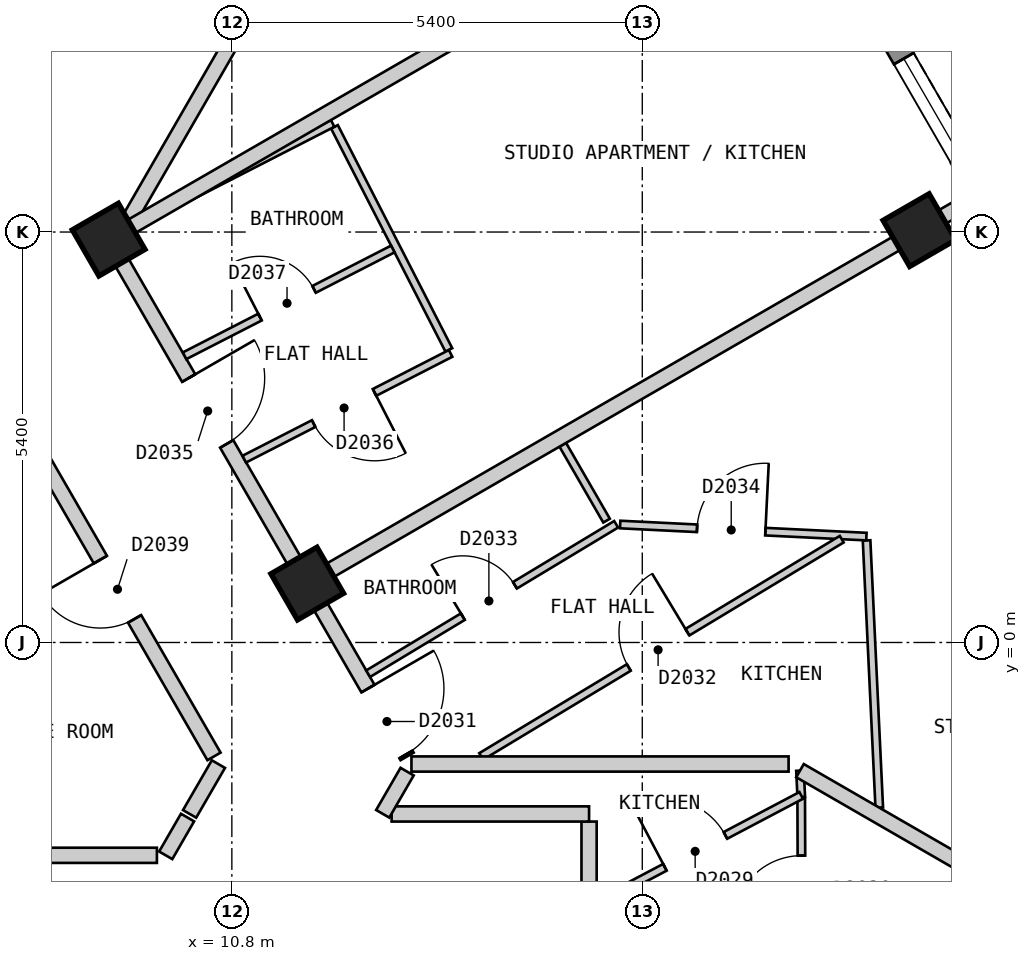
"""IFC4 building model, lengths in metres.
Left out: names, types, materials, properties, quantities, classifications, styles, units other than length and angle.
Written with IfcOpenShell. Run it as: python <this file> out.ifc"""

import sys

from ifc_helpers import new_model, si_unit, direction, frame, frame_2d, origin, origin_2d, place, context, subcontext, project, spatial, polyline, rectangle, outline, extrude, element, fill, save


model = new_model("IFC4")
c1 = context("Model", 3, precision=1e-05, world=origin(), true_north=direction((0.0, 1.0)))
c2 = subcontext(c1, "Body", "Model", "MODEL_VIEW")
j1 = project(units=[si_unit("LENGTHUNIT", "METRE"), si_unit("PLANEANGLEUNIT", "RADIAN")], contexts=[c1])
p1 = place(None, origin())
s1 = spatial("IfcSite", under=j1, at=p1, CompositionType="ELEMENT")
p2 = place(p1, origin())
s2 = spatial("IfcBuilding", under=s1, at=p2, CompositionType="ELEMENT")
p3 = place(p2, frame((0.0, 0.0, 238.8)))
s3 = spatial("IfcBuildingStorey", under=s2, at=p3, CompositionType="ELEMENT", Elevation=238.8)
for number, where, z_axis, x_axis in (
    (1, (19.846, 5.425, 0.0), (0.0, 0.0, 1.0), (-0.5, 0.866, 0.0)),
    (2, (11.792, 0.775, 0.0), (0.0, 0.0, 1.0), (-0.5, 0.866, 0.0)),
    (3, (9.179, 5.3, 0.0), (0.0, 0.0, 1.0), (-0.5, 0.866, 0.0)),
):
    element("IfcColumn", number, at=place(p3, frame(where, z_axis=z_axis, x_axis=x_axis)), inside=s3, PredefinedType="COLUMN", context=c2, shape_type="SweptSolid", body=[
        extrude(rectangle(XDim=0.7, YDim=0.7, at=origin_2d()), origin(), (0.0, 0.0, 1.0), 3.0),
    ])
p4 = place(p3, frame((23.599, 0.825, 0.0), z_axis=(0.0, 0.0, 1.0), x_axis=(-0.500003656944, 0.866023292436, 0.0)))
e4 = element("IfcWall", 4, at=p4, inside=s3, PredefinedType="SOLIDWALL", context=c2, shape_type="SweptSolid", body=[
    extrude(outline(polyline([(0.0, -0.15), (22.17, -0.15), (22.09, 0.15), (0.08, 0.15), (0.0, -0.15)])), origin(), (0.0, 0.0, 1.0), 2.7),
])
p5 = place(p4, frame((1.191, 0.0, 0.15)))
e5 = element("IfcOpeningElement", 5, at=p5, cuts=e4, PredefinedType="OPENING", context=c2, shape_type="SweptSolid", body=[
    extrude(rectangle(XDim=1.5, YDim=2.1, at=frame_2d((0.75, 1.05))), frame((0.0, 0.16, 0.0), z_axis=(0.0, -1.0, 0.0), x_axis=(1.0, 0.0, 0.0)), (0.0, 0.0, 1.0), 0.32),
])
p6 = place(p4, frame((3.804, 0.0, 0.15)))
e6 = element("IfcOpeningElement", 6, at=p6, cuts=e4, PredefinedType="OPENING", context=c2, shape_type="SweptSolid", body=[
    extrude(rectangle(XDim=1.5, YDim=2.1, at=frame_2d((0.75, 1.05))), frame((0.0, 0.16, 0.0), z_axis=(0.0, -1.0, 0.0), x_axis=(1.0, 0.0, 0.0)), (0.0, 0.0, 1.0), 0.32),
])
p7 = place(p4, frame((6.417, 0.0, 0.15)))
e7 = element("IfcOpeningElement", 7, at=p7, cuts=e4, PredefinedType="OPENING", context=c2, shape_type="SweptSolid", body=[
    extrude(rectangle(XDim=1.5, YDim=2.1, at=frame_2d((0.75, 1.05))), frame((0.0, 0.16, 0.0), z_axis=(0.0, -1.0, 0.0), x_axis=(1.0, 0.0, 0.0)), (0.0, 0.0, 1.0), 0.32),
])
p8 = place(p4, frame((9.029, 0.0, 0.15)))
e8 = element("IfcOpeningElement", 8, at=p8, cuts=e4, PredefinedType="OPENING", context=c2, shape_type="SweptSolid", body=[
    extrude(rectangle(XDim=1.5, YDim=2.1, at=frame_2d((0.75, 1.05))), frame((0.0, 0.16, 0.0), z_axis=(0.0, -1.0, 0.0), x_axis=(1.0, 0.0, 0.0)), (0.0, 0.0, 1.0), 0.32),
])
p9 = place(p4, frame((11.641, 0.0, 0.15)))
e9 = element("IfcOpeningElement", 9, at=p9, cuts=e4, PredefinedType="OPENING", context=c2, shape_type="SweptSolid", body=[
    extrude(rectangle(XDim=1.5, YDim=2.1, at=frame_2d((0.75, 1.05))), frame((0.0, 0.16, 0.0), z_axis=(0.0, -1.0, 0.0), x_axis=(1.0, 0.0, 0.0)), (0.0, 0.0, 1.0), 0.32),
])
p10 = place(p4, frame((14.254, 0.0, 0.15)))
e10 = element("IfcOpeningElement", 10, at=p10, cuts=e4, PredefinedType="OPENING", context=c2, shape_type="SweptSolid", body=[
    extrude(rectangle(XDim=1.5, YDim=2.1, at=frame_2d((0.75, 1.05))), frame((0.0, 0.16, 0.0), z_axis=(0.0, -1.0, 0.0), x_axis=(1.0, 0.0, 0.0)), (0.0, 0.0, 1.0), 0.32),
])
p11 = place(p4, frame((16.866, 0.0, 0.15)))
e11 = element("IfcOpeningElement", 11, at=p11, cuts=e4, PredefinedType="OPENING", context=c2, shape_type="SweptSolid", body=[
    extrude(rectangle(XDim=1.5, YDim=2.1, at=frame_2d((0.75, 1.05))), frame((0.0, 0.16, 0.0), z_axis=(0.0, -1.0, 0.0), x_axis=(1.0, 0.0, 0.0)), (0.0, 0.0, 1.0), 0.32),
])
p12 = place(p4, frame((19.479, 0.0, 0.15)))
e12 = element("IfcOpeningElement", 12, at=p12, cuts=e4, PredefinedType="OPENING", context=c2, shape_type="SweptSolid", body=[
    extrude(rectangle(XDim=1.5, YDim=2.1, at=frame_2d((0.75, 1.05))), frame((0.0, 0.16, 0.0), z_axis=(0.0, -1.0, 0.0), x_axis=(1.0, 0.0, 0.0)), (0.0, 0.0, 1.0), 0.32),
])
p13 = place(p3, frame((8.026, 2.899, 0.0), z_axis=(0.0, 0.0, 1.0), x_axis=(0.499986018985, -0.866033475577, 0.0)))
e13 = element("IfcWall", 13, at=p13, inside=s3, PredefinedType="PARTITIONING", context=c2, shape_type="SweptSolid", body=[
    extrude(rectangle(XDim=5.078, YDim=0.2, at=frame_2d((2.539, 0.0))), origin(), (0.0, 0.0, 1.0), 2.7),
])
p14 = place(p13, frame((2.089, 0.0, 0.0)))
e14 = element("IfcOpeningElement", 14, at=p14, cuts=e13, PredefinedType="OPENING", context=c2, shape_type="SweptSolid", body=[
    extrude(rectangle(XDim=0.9, YDim=2.1, at=frame_2d((0.45, 1.05))), frame((0.0, 0.11, 0.0), z_axis=(0.0, -1.0, 0.0), x_axis=(1.0, 0.0, 0.0)), (0.0, 0.0, 1.0), 0.22),
])
p15 = place(p3, frame((9.238, 5.2, 0.0), z_axis=(0.0, 0.0, 1.0), x_axis=(0.500025705601, -0.86601056214, 0.0)))
e15 = element("IfcWall", 15, at=p15, inside=s3, PredefinedType="PARTITIONING", context=c2, shape_type="SweptSolid", body=[
    extrude(rectangle(XDim=7.735, YDim=0.2, at=frame_2d((3.868, 0.0))), origin(), (0.0, 0.0, 1.0), 2.7),
])
p16 = place(p15, frame((6.705, 0.0, 0.0)))
e16 = element("IfcOpeningElement", 16, at=p16, cuts=e15, PredefinedType="OPENING", context=c2, shape_type="SweptSolid", body=[
    extrude(rectangle(XDim=1.0, YDim=2.1, at=frame_2d((0.5, 1.05))), frame((0.0, 0.11, 0.0), z_axis=(0.0, -1.0, 0.0), x_axis=(1.0, 0.0, 0.0)), (0.0, 0.0, 1.0), 0.22),
])
p17 = place(p15, frame((1.988, 0.0, 0.0)))
e17 = element("IfcOpeningElement", 17, at=p17, cuts=e15, PredefinedType="OPENING", context=c2, shape_type="SweptSolid", body=[
    extrude(rectangle(XDim=1.0, YDim=2.1, at=frame_2d((0.5, 1.05))), frame((0.0, 0.11, 0.0), z_axis=(0.0, -1.0, 0.0), x_axis=(1.0, 0.0, 0.0)), (0.0, 0.0, 1.0), 0.22),
])
p18 = place(p3, frame((15.5, -2.356, 0.0), z_axis=(0.0, 0.0, 1.0), x_axis=(0.0, -1.0, 0.0)))
e18 = element("IfcWall", 18, at=p18, inside=s3, PredefinedType="PARTITIONING", context=c2, shape_type="SweptSolid", body=[
    extrude(rectangle(XDim=1.071, YDim=0.2, at=frame_2d((0.536, 0.0))), origin(), (0.0, 0.0, 1.0), 2.7),
])
p19 = place(p3, frame((12.902, -2.256, 0.0), z_axis=(0.0, 0.0, 1.0), x_axis=(1.0, 0.0, 0.0)))
e19 = element("IfcWall", 19, at=p19, inside=s3, PredefinedType="PARTITIONING", context=c2, shape_type="SweptSolid", body=[
    extrude(rectangle(XDim=2.598, YDim=0.2, at=frame_2d((1.299, 0.0))), origin(), (0.0, 0.0, 1.0), 2.7),
])
p20 = place(p3, frame((6.929, -2.8, 0.0), z_axis=(0.0, 0.0, 1.0), x_axis=(1.0, 0.0, 0.0)))
e20 = element("IfcWall", 20, at=p20, inside=s3, PredefinedType="PARTITIONING", context=c2, shape_type="SweptSolid", body=[
    extrude(rectangle(XDim=2.885, YDim=0.2, at=frame_2d((1.442, 0.0))), origin(), (0.0, 0.0, 1.0), 2.7),
])
p21 = place(p3, frame((9.454, 5.574, 0.0), z_axis=(0.0, 0.0, 1.0), x_axis=(0.499795394297, 0.86614350072, 0.0)))
e21 = element("IfcWall", 21, at=p21, inside=s3, PredefinedType="PARTITIONING", context=c2, shape_type="SweptSolid", body=[
    extrude(rectangle(XDim=2.801, YDim=0.2, at=frame_2d((1.4, 0.0))), origin(), (0.0, 0.0, 1.0), 2.7),
])
p22 = place(p3, frame((9.93, -2.8, 0.0), z_axis=(0.0, 0.0, 1.0), x_axis=(0.500164219654, 0.865930570761, 0.0)))
e22 = element("IfcWall", 22, at=p22, inside=s3, PredefinedType="PARTITIONING", context=c2, shape_type="SweptSolid", body=[
    extrude(rectangle(XDim=0.574, YDim=0.2, at=frame_2d((0.287, 0.0))), origin(), (0.0, 0.0, 1.0), 2.7),
])
p23 = place(p3, frame((10.244, -2.255, 0.0), z_axis=(0.0, 0.0, 1.0), x_axis=(0.50109986513, 0.865389464442, 0.0)))
e23 = element("IfcWall", 23, at=p23, inside=s3, PredefinedType="PARTITIONING", context=c2, shape_type="SweptSolid", body=[
    extrude(rectangle(XDim=0.757, YDim=0.2, at=frame_2d((0.378, 0.0))), origin(), (0.0, 0.0, 1.0), 2.7),
])
p24 = place(p3, frame((12.785, -2.254, 0.0), z_axis=(0.0, 0.0, 1.0), x_axis=(0.500766044352, 0.865582675903, 0.0)))
e24 = element("IfcWall", 24, at=p24, inside=s3, PredefinedType="PARTITIONING", context=c2, shape_type="SweptSolid", body=[
    extrude(rectangle(XDim=0.641, YDim=0.2, at=frame_2d((0.321, 0.0))), origin(), (0.0, 0.0, 1.0), 2.7),
])
p25 = place(p3, frame((15.154, 2.601, 0.0), z_axis=(0.0, 0.0, 1.0), x_axis=(0.499808046739, -0.866136199691, 0.0)))
e25 = element("IfcWall", 25, at=p25, inside=s3, PredefinedType="PARTITIONING", context=c2, shape_type="SweptSolid", body=[
    extrude(rectangle(XDim=1.152, YDim=0.1, at=frame_2d((0.576, 0.0))), origin(), (0.0, 0.0, 1.0), 2.7),
])
p26 = place(p3, frame((12.15, 6.784, 0.0), z_axis=(0.0, 0.0, 1.0), x_axis=(0.456339188969, -0.889805902774, 0.0)))
e26 = element("IfcWall", 26, at=p26, inside=s3, PredefinedType="PARTITIONING", context=c2, shape_type="SweptSolid", body=[
    extrude(rectangle(XDim=3.298, YDim=0.1, at=frame_2d((1.649, 0.0))), origin(), (0.0, 0.0, 1.0), 2.7),
])
p27 = place(p3, frame((18.275, -1.686, 0.0), z_axis=(0.0, 0.0, 1.0), x_axis=(0.049063646166, -0.998795654088, 0.0)))
e27 = element("IfcWall", 27, at=p27, inside=s3, PredefinedType="PARTITIONING", context=c2, shape_type="SweptSolid", body=[
    extrude(rectangle(XDim=0.348, YDim=0.1, at=frame_2d((0.174, 0.0))), origin(), (0.0, 0.0, 1.0), 2.7),
])
p28 = place(p3, frame((19.151, 1.343, 0.0), z_axis=(0.0, 0.0, 1.0), x_axis=(0.047509130714, -0.998870803707, 0.0)))
e28 = element("IfcWall", 28, at=p28, inside=s3, PredefinedType="PARTITIONING", context=c2, shape_type="SweptSolid", body=[
    extrude(rectangle(XDim=3.52, YDim=0.1, at=frame_2d((1.76, 0.0))), origin(), (0.0, 0.0, 1.0), 2.7),
])
p29 = place(p3, frame((18.291, -2.048, 0.0), z_axis=(0.0, 0.0, 1.0), x_axis=(0.003743776253, -0.999992992045, 0.0)))
e29 = element("IfcWall", 29, at=p29, inside=s3, PredefinedType="PARTITIONING", context=c2, shape_type="SweptSolid", body=[
    extrude(rectangle(XDim=2.413, YDim=0.1, at=frame_2d((1.207, 0.0))), origin(), (0.0, 0.0, 1.0), 2.7),
])
p30 = place(p29, frame((0.756, 0.0, 0.0)))
e30 = element("IfcOpeningElement", 30, at=p30, cuts=e29, PredefinedType="OPENING", context=c2, shape_type="SweptSolid", body=[
    extrude(rectangle(XDim=0.9, YDim=2.1, at=frame_2d((0.45, 1.05))), frame((0.0, 0.06, 0.0), z_axis=(0.0, -1.0, 0.0), x_axis=(1.0, 0.0, 0.0)), (0.0, 0.0, 1.0), 0.12),
])
p31 = place(p3, frame((15.909, 1.552, 0.0), z_axis=(0.0, 0.0, 1.0), x_axis=(0.998799003463, -0.048995414909, 0.0)))
e31 = element("IfcWall", 31, at=p31, inside=s3, PredefinedType="PARTITIONING", context=c2, shape_type="SweptSolid", body=[
    extrude(rectangle(XDim=3.244, YDim=0.1, at=frame_2d((1.622, 0.0))), origin(), (0.0, 0.0, 1.0), 2.7),
])
p32 = place(p31, frame((1.013, 0.0, 0.0)))
e32 = element("IfcOpeningElement", 32, at=p32, cuts=e31, PredefinedType="OPENING", context=c2, shape_type="SweptSolid", body=[
    extrude(rectangle(XDim=0.9, YDim=2.1, at=frame_2d((0.45, 1.05))), frame((0.0, 0.06, 0.0), z_axis=(0.0, -1.0, 0.0), x_axis=(1.0, 0.0, 0.0)), (0.0, 0.0, 1.0), 0.12),
])
p33 = place(p3, frame((10.178, 3.772, 0.0), z_axis=(0.0, 0.0, 1.0), x_axis=(0.889829844516, 0.456292502467, 0.0)))
e33 = element("IfcWall", 33, at=p33, inside=s3, PredefinedType="PARTITIONING", context=c2, shape_type="SweptSolid", body=[
    extrude(rectangle(XDim=3.079, YDim=0.1, at=frame_2d((1.54, 0.0))), origin(), (0.0, 0.0, 1.0), 2.7),
])
p34 = place(p33, frame((1.115, 0.0, 0.0)))
e34 = element("IfcOpeningElement", 34, at=p34, cuts=e33, PredefinedType="OPENING", context=c2, shape_type="SweptSolid", body=[
    extrude(rectangle(XDim=0.8, YDim=2.1, at=frame_2d((0.4, 1.05))), frame((0.0, 0.06, 0.0), z_axis=(0.0, -1.0, 0.0), x_axis=(1.0, 0.0, 0.0)), (0.0, 0.0, 1.0), 0.12),
])
p35 = place(p3, frame((10.963, 2.412, 0.0), z_axis=(0.0, 0.0, 1.0), x_axis=(0.890014850977, 0.455931535475, 0.0)))
e35 = element("IfcWall", 35, at=p35, inside=s3, PredefinedType="PARTITIONING", context=c2, shape_type="SweptSolid", body=[
    extrude(rectangle(XDim=3.051, YDim=0.1, at=frame_2d((1.525, 0.0))), origin(), (0.0, 0.0, 1.0), 2.7),
])
p36 = place(p35, frame((1.026, 0.0, 0.0)))
e36 = element("IfcOpeningElement", 36, at=p36, cuts=e35, PredefinedType="OPENING", context=c2, shape_type="SweptSolid", body=[
    extrude(rectangle(XDim=0.9, YDim=2.1, at=frame_2d((0.45, 1.05))), frame((0.0, 0.06, 0.0), z_axis=(0.0, -1.0, 0.0), x_axis=(1.0, 0.0, 0.0)), (0.0, 0.0, 1.0), 0.12),
])
p37 = place(p3, frame((9.457, 5.461, 0.0), z_axis=(0.0, 0.0, 1.0), x_axis=(0.889888641814, 0.456177821874, 0.0)))
e37 = element("IfcWall", 37, at=p37, inside=s3, PredefinedType="PARTITIONING", context=c2, shape_type="SweptSolid", body=[
    extrude(rectangle(XDim=2.999, YDim=0.1, at=frame_2d((1.5, 0.0))), origin(), (0.0, 0.0, 1.0), 2.7),
])
p38 = place(p3, frame((15.5, -3.484, 0.0), z_axis=(0.0, 0.0, 1.0), x_axis=(0.884530210683, 0.466482911145, 0.0)))
e38 = element("IfcWall", 38, at=p38, inside=s3, PredefinedType="PARTITIONING", context=c2, shape_type="SweptSolid", body=[
    extrude(rectangle(XDim=3.155, YDim=0.1, at=frame_2d((1.578, 0.0))), origin(), (0.0, 0.0, 1.0), 2.7),
])
p39 = place(p38, frame((1.128, 0.0, 0.0)))
e39 = element("IfcOpeningElement", 39, at=p39, cuts=e38, PredefinedType="OPENING", context=c2, shape_type="SweptSolid", body=[
    extrude(rectangle(XDim=0.9, YDim=2.1, at=frame_2d((0.45, 1.05))), frame((0.0, 0.06, 0.0), z_axis=(0.0, -1.0, 0.0), x_axis=(1.0, 0.0, 0.0)), (0.0, 0.0, 1.0), 0.12),
])
p40 = place(p3, frame((12.593, -0.411, 0.0), z_axis=(0.0, 0.0, 1.0), x_axis=(0.856558445359, 0.516050026339, 0.0)))
e40 = element("IfcWall", 40, at=p40, inside=s3, PredefinedType="PARTITIONING", context=c2, shape_type="SweptSolid", body=[
    extrude(rectangle(XDim=3.809, YDim=0.1, at=frame_2d((1.905, 0.0))), origin(), (0.0, 0.0, 1.0), 2.7),
])
p41 = place(p40, frame((1.455, 0.0, 0.0)))
e41 = element("IfcOpeningElement", 41, at=p41, cuts=e40, PredefinedType="OPENING", context=c2, shape_type="SweptSolid", body=[
    extrude(rectangle(XDim=0.8, YDim=2.1, at=frame_2d((0.4, 1.05))), frame((0.0, 0.06, 0.0), z_axis=(0.0, -1.0, 0.0), x_axis=(1.0, 0.0, 0.0)), (0.0, 0.0, 1.0), 0.12),
])
p42 = place(p3, frame((14.081, -1.499, 0.0), z_axis=(0.0, 0.0, 1.0), x_axis=(0.85652273816, 0.516109289798, 0.0)))
e42 = element("IfcWall", 42, at=p42, inside=s3, PredefinedType="PARTITIONING", context=c2, shape_type="SweptSolid", body=[
    extrude(rectangle(XDim=5.537, YDim=0.1, at=frame_2d((2.769, 0.0))), origin(), (0.0, 0.0, 1.0), 2.7),
])
p43 = place(p42, frame((2.267, 0.0, 0.0)))
e43 = element("IfcOpeningElement", 43, at=p43, cuts=e42, PredefinedType="OPENING", context=c2, shape_type="SweptSolid", body=[
    extrude(rectangle(XDim=0.9, YDim=2.1, at=frame_2d((0.45, 1.05))), frame((0.0, 0.06, 0.0), z_axis=(0.0, -1.0, 0.0), x_axis=(1.0, 0.0, 0.0)), (0.0, 0.0, 1.0), 0.12),
])
p44 = place(p3, frame((18.275, -1.686, 0.0), z_axis=(0.0, 0.0, 1.0), x_axis=(0.866041167766, -0.49997269499, 0.0)))
e44 = element("IfcWall", 44, at=p44, inside=s3, PredefinedType="PARTITIONING", context=c2, shape_type="SweptSolid", body=[
    extrude(rectangle(XDim=5.63, YDim=0.2, at=frame_2d((2.815, 0.0))), origin(), (0.0, 0.0, 1.0), 2.7),
])
p45 = place(p3, frame((13.163, -1.599, 0.0), z_axis=(0.0, 0.0, 1.0), x_axis=(1.0, 0.0, 0.0)))
e45 = element("IfcWall", 45, at=p45, inside=s3, PredefinedType="PARTITIONING", context=c2, shape_type="SweptSolid", body=[
    extrude(rectangle(XDim=4.962, YDim=0.2, at=frame_2d((2.481, 0.0))), origin(), (0.0, 0.0, 1.0), 2.7),
])
p46 = place(p3, frame((11.879, 0.826, 0.0), z_axis=(0.0, 0.0, 1.0), x_axis=(0.866065245018, 0.499930986609, 0.0)))
e46 = element("IfcWall", 46, at=p46, inside=s3, PredefinedType="PARTITIONING", context=c2, shape_type="SweptSolid", body=[
    extrude(rectangle(XDim=10.0, YDim=0.2, at=frame_2d((5.0, 0.0))), origin(), (0.0, 0.0, 1.0), 2.7),
])
p47 = place(p3, frame((9.354, 5.401, 0.0), z_axis=(0.0, 0.0, 1.0), x_axis=(0.866018411306, 0.500012111133, 0.0)))
e47 = element("IfcWall", 47, at=p47, inside=s3, PredefinedType="PARTITIONING", context=c2, shape_type="SweptSolid", body=[
    extrude(rectangle(XDim=9.898, YDim=0.2, at=frame_2d((4.949, 0.0))), origin(), (0.0, 0.0, 1.0), 2.7),
])
p48 = place(p7, origin())
e48 = element("IfcWindow", 48, at=p48, inside=s3, PartitioningType="SINGLE_PANEL", PredefinedType="WINDOW", context=c2, shape_type="SweptSolid", body=[
    extrude(rectangle(XDim=1.5, YDim=2.1, at=frame_2d((0.75, 1.05))), frame((0.0, 0.03, 0.0), z_axis=(0.0, -1.0, 0.0), x_axis=(1.0, 0.0, 0.0)), (0.0, 0.0, 1.0), 0.06),
])
fill(e7, e48)
p49 = place(p39, origin())
e49 = element("IfcDoor", 49, at=p49, inside=s3, OperationType="SINGLE_SWING_LEFT", PredefinedType="DOOR", context=c2, shape_type="SweptSolid", body=[
    extrude(rectangle(XDim=0.9, YDim=2.1, at=frame_2d((0.45, 1.05))), frame((0.0, 0.025, 0.0), z_axis=(0.0, -1.0, 0.0), x_axis=(1.0, 0.0, 0.0)), (0.0, 0.0, 1.0), 0.05),
])
fill(e39, e49)
p50 = place(p30, origin())
e50 = element("IfcDoor", 50, at=p50, inside=s3, OperationType="SINGLE_SWING_RIGHT", PredefinedType="DOOR", context=c2, shape_type="SweptSolid", body=[
    extrude(rectangle(XDim=0.9, YDim=2.1, at=frame_2d((0.45, 1.05))), frame((0.0, 0.025, 0.0), z_axis=(0.0, -1.0, 0.0), x_axis=(1.0, 0.0, 0.0)), (0.0, 0.0, 1.0), 0.05),
])
fill(e30, e50)
p51 = place(p16, origin())
e51 = element("IfcDoor", 51, at=p51, inside=s3, OperationType="SINGLE_SWING_LEFT", PredefinedType="DOOR", context=c2, shape_type="SweptSolid", body=[
    extrude(rectangle(XDim=1.0, YDim=2.1, at=frame_2d((0.5, 1.05))), frame((0.0, 0.025, 0.0), z_axis=(0.0, -1.0, 0.0), x_axis=(1.0, 0.0, 0.0)), (0.0, 0.0, 1.0), 0.05),
])
fill(e16, e51)
p52 = place(p43, origin())
e52 = element("IfcDoor", 52, at=p52, inside=s3, OperationType="SINGLE_SWING_RIGHT", PredefinedType="DOOR", context=c2, shape_type="SweptSolid", body=[
    extrude(rectangle(XDim=0.9, YDim=2.1, at=frame_2d((0.45, 1.05))), frame((0.0, 0.025, 0.0), z_axis=(0.0, -1.0, 0.0), x_axis=(1.0, 0.0, 0.0)), (0.0, 0.0, 1.0), 0.05),
])
fill(e43, e52)
p53 = place(p41, origin())
e53 = element("IfcDoor", 53, at=p53, inside=s3, OperationType="SINGLE_SWING_LEFT", PredefinedType="DOOR", context=c2, shape_type="SweptSolid", body=[
    extrude(rectangle(XDim=0.8, YDim=2.1, at=frame_2d((0.4, 1.05))), frame((0.0, 0.025, 0.0), z_axis=(0.0, -1.0, 0.0), x_axis=(1.0, 0.0, 0.0)), (0.0, 0.0, 1.0), 0.05),
])
fill(e41, e53)
p54 = place(p32, origin())
e54 = element("IfcDoor", 54, at=p54, inside=s3, OperationType="SINGLE_SWING_RIGHT", PredefinedType="DOOR", context=c2, shape_type="SweptSolid", body=[
    extrude(rectangle(XDim=0.9, YDim=2.1, at=frame_2d((0.45, 1.05))), frame((0.0, 0.025, 0.0), z_axis=(0.0, -1.0, 0.0), x_axis=(1.0, 0.0, 0.0)), (0.0, 0.0, 1.0), 0.05),
])
fill(e32, e54)
p55 = place(p17, origin())
e55 = element("IfcDoor", 55, at=p55, inside=s3, OperationType="SINGLE_SWING_LEFT", PredefinedType="DOOR", context=c2, shape_type="SweptSolid", body=[
    extrude(rectangle(XDim=1.0, YDim=2.1, at=frame_2d((0.5, 1.05))), frame((0.0, 0.025, 0.0), z_axis=(0.0, -1.0, 0.0), x_axis=(1.0, 0.0, 0.0)), (0.0, 0.0, 1.0), 0.05),
])
fill(e17, e55)
p56 = place(p36, origin())
e56 = element("IfcDoor", 56, at=p56, inside=s3, OperationType="SINGLE_SWING_RIGHT", PredefinedType="DOOR", context=c2, shape_type="SweptSolid", body=[
    extrude(rectangle(XDim=0.9, YDim=2.1, at=frame_2d((0.45, 1.05))), frame((0.0, 0.025, 0.0), z_axis=(0.0, -1.0, 0.0), x_axis=(1.0, 0.0, 0.0)), (0.0, 0.0, 1.0), 0.05),
])
fill(e36, e56)
p57 = place(p34, origin())
e57 = element("IfcDoor", 57, at=p57, inside=s3, OperationType="SINGLE_SWING_LEFT", PredefinedType="DOOR", context=c2, shape_type="SweptSolid", body=[
    extrude(rectangle(XDim=0.8, YDim=2.1, at=frame_2d((0.4, 1.05))), frame((0.0, 0.025, 0.0), z_axis=(0.0, -1.0, 0.0), x_axis=(1.0, 0.0, 0.0)), (0.0, 0.0, 1.0), 0.05),
])
fill(e34, e57)
p58 = place(p14, origin())
e58 = element("IfcDoor", 58, at=p58, inside=s3, OperationType="SINGLE_SWING_LEFT", PredefinedType="DOOR", context=c2, shape_type="SweptSolid", body=[
    extrude(rectangle(XDim=0.9, YDim=2.1, at=frame_2d((0.45, 1.05))), frame((0.0, 0.025, 0.0), z_axis=(0.0, -1.0, 0.0), x_axis=(1.0, 0.0, 0.0)), (0.0, 0.0, 1.0), 0.05),
])
fill(e14, e58)
save(model, sys.argv[1])
